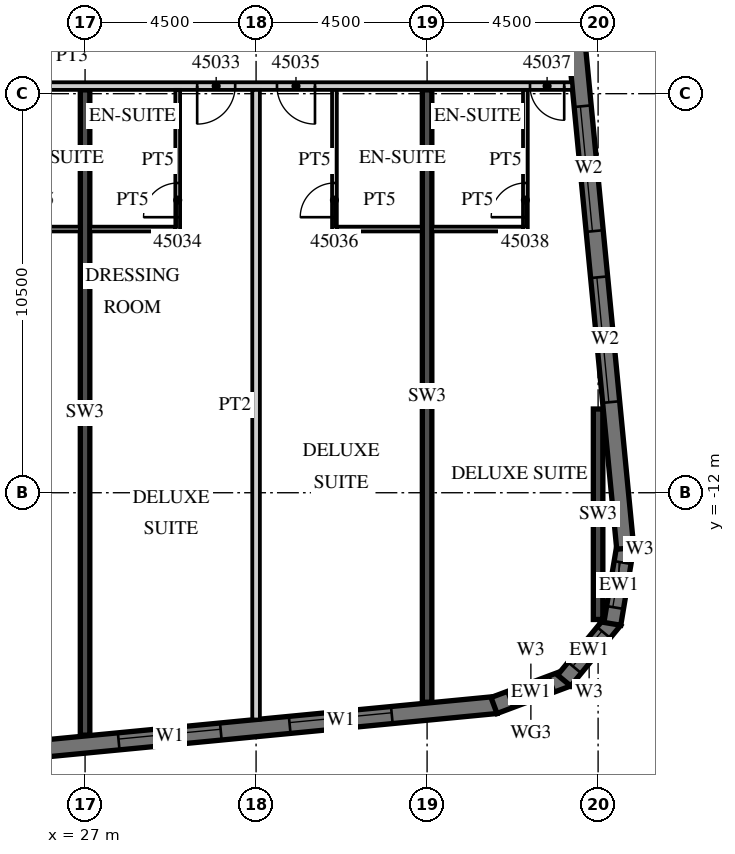
"""IFC4 building model, lengths in metres.
Left out: names, types, materials, properties, quantities, classifications, styles, units other than length and angle.
Written with IfcOpenShell. Run it as: python <this file> out.ifc"""

import sys

from ifc_helpers import new_model, si_unit, direction, frame, frame_2d, origin, place, context, subcontext, project, spatial, polyline, rectangle, outline, extrude, element, fill, save


model = new_model("IFC4")
c1 = context("Model", 3, precision=1e-05, world=origin(), true_north=direction((0.0, 1.0)))
c2 = subcontext(c1, "Body", "Model", "MODEL_VIEW")
j1 = project(units=[si_unit("LENGTHUNIT", "METRE"), si_unit("PLANEANGLEUNIT", "RADIAN")], contexts=[c1])
p1 = place(None, origin())
s1 = spatial("IfcSite", under=j1, at=p1, CompositionType="ELEMENT")
p2 = place(p1, origin())
s2 = spatial("IfcBuilding", under=s1, at=p2, CompositionType="ELEMENT")
p3 = place(p2, frame((0.0, 0.0, 190.0)))
s3 = spatial("IfcBuildingStorey", under=s2, at=p3, CompositionType="ELEMENT", Elevation=190.0)
p4 = place(p3, frame((27.0, -18.379, 0.0), z_axis=(0.0, 0.0, 1.0), x_axis=(0.0, 1.0, 0.0)))
e1 = element("IfcWall", 1, at=p4, inside=s3, PredefinedType="SHEAR", context=c2, shape_type="SweptSolid", body=[
    extrude(rectangle(XDim=16.979, YDim=0.25, at=frame_2d((8.489, 0.0))), origin(), (0.0, 0.0, 1.0), 3.3),
])
p5 = place(p3, frame((36.0, -17.512, 0.0), z_axis=(0.0, 0.0, 1.0), x_axis=(0.0, 1.0, 0.0)))
e2 = element("IfcWall", 2, at=p5, inside=s3, PredefinedType="SHEAR", context=c2, shape_type="SweptSolid", body=[
    extrude(rectangle(XDim=16.112, YDim=0.25, at=frame_2d((8.056, 0.0))), origin(), (0.0, 0.0, 1.0), 3.3),
])
p6 = place(p3, frame((40.5, -15.335, 0.0), z_axis=(0.0, 0.0, 1.0), x_axis=(0.0, 1.0, 0.0)))
e3 = element("IfcWall", 3, at=p6, inside=s3, PredefinedType="SHEAR", context=c2, shape_type="SweptSolid", body=[
    extrude(rectangle(XDim=5.538, YDim=0.25, at=frame_2d((2.769, 0.0))), origin(), (0.0, 0.0, 1.0), 3.3),
])
p7 = place(p3, frame((-13.521, -22.529, 0.0), z_axis=(0.0, 0.0, 1.0), x_axis=(0.995396436651, 0.095843277819, 0.0)))
e4 = element("IfcWall", 4, at=p7, inside=s3, PredefinedType="SOLIDWALL", context=c2, shape_type="SweptSolid", body=[
    extrude(rectangle(XDim=51.578, YDim=0.45, at=frame_2d((25.789, 0.0))), origin(), (0.0, 0.0, 1.0), 3.02),
])
p8 = place(p7, frame((0.91, 0.0, 0.45)))
e5 = element("IfcOpeningElement", 5, at=p8, cuts=e4, PredefinedType="OPENING", context=c2, shape_type="SweptSolid", body=[
    extrude(rectangle(XDim=2.7, YDim=2.25, at=frame_2d((1.35, 1.125))), frame((0.0, 0.235, 0.0), z_axis=(0.0, -1.0, 0.0), x_axis=(1.0, 0.0, 0.0)), (0.0, 0.0, 1.0), 0.47),
])
p9 = place(p7, frame((5.431, 0.0, 0.45)))
e6 = element("IfcOpeningElement", 6, at=p9, cuts=e4, PredefinedType="OPENING", context=c2, shape_type="SweptSolid", body=[
    extrude(rectangle(XDim=2.7, YDim=2.25, at=frame_2d((1.35, 1.125))), frame((0.0, 0.235, 0.0), z_axis=(0.0, -1.0, 0.0), x_axis=(1.0, 0.0, 0.0)), (0.0, 0.0, 1.0), 0.47),
])
p10 = place(p7, frame((9.952, 0.0, 0.45)))
e7 = element("IfcOpeningElement", 7, at=p10, cuts=e4, PredefinedType="OPENING", context=c2, shape_type="SweptSolid", body=[
    extrude(rectangle(XDim=2.7, YDim=2.25, at=frame_2d((1.35, 1.125))), frame((0.0, 0.235, 0.0), z_axis=(0.0, -1.0, 0.0), x_axis=(1.0, 0.0, 0.0)), (0.0, 0.0, 1.0), 0.47),
])
p11 = place(p7, frame((14.473, 0.0, 0.45)))
e8 = element("IfcOpeningElement", 8, at=p11, cuts=e4, PredefinedType="OPENING", context=c2, shape_type="SweptSolid", body=[
    extrude(rectangle(XDim=2.7, YDim=2.25, at=frame_2d((1.35, 1.125))), frame((0.0, 0.235, 0.0), z_axis=(0.0, -1.0, 0.0), x_axis=(1.0, 0.0, 0.0)), (0.0, 0.0, 1.0), 0.47),
])
p12 = place(p7, frame((18.994, 0.0, 0.45)))
e9 = element("IfcOpeningElement", 9, at=p12, cuts=e4, PredefinedType="OPENING", context=c2, shape_type="SweptSolid", body=[
    extrude(rectangle(XDim=2.7, YDim=2.25, at=frame_2d((1.35, 1.125))), frame((0.0, 0.235, 0.0), z_axis=(0.0, -1.0, 0.0), x_axis=(1.0, 0.0, 0.0)), (0.0, 0.0, 1.0), 0.47),
])
p13 = place(p7, frame((23.514, 0.0, 0.45)))
e10 = element("IfcOpeningElement", 10, at=p13, cuts=e4, PredefinedType="OPENING", context=c2, shape_type="SweptSolid", body=[
    extrude(rectangle(XDim=2.7, YDim=2.25, at=frame_2d((1.35, 1.125))), frame((0.0, 0.235, 0.0), z_axis=(0.0, -1.0, 0.0), x_axis=(1.0, 0.0, 0.0)), (0.0, 0.0, 1.0), 0.47),
])
p14 = place(p7, frame((28.035, 0.0, 0.45)))
e11 = element("IfcOpeningElement", 11, at=p14, cuts=e4, PredefinedType="OPENING", context=c2, shape_type="SweptSolid", body=[
    extrude(rectangle(XDim=2.7, YDim=2.25, at=frame_2d((1.35, 1.125))), frame((0.0, 0.235, 0.0), z_axis=(0.0, -1.0, 0.0), x_axis=(1.0, 0.0, 0.0)), (0.0, 0.0, 1.0), 0.47),
])
p15 = place(p7, frame((32.556, 0.0, 0.45)))
e12 = element("IfcOpeningElement", 12, at=p15, cuts=e4, PredefinedType="OPENING", context=c2, shape_type="SweptSolid", body=[
    extrude(rectangle(XDim=2.7, YDim=2.25, at=frame_2d((1.35, 1.125))), frame((0.0, 0.235, 0.0), z_axis=(0.0, -1.0, 0.0), x_axis=(1.0, 0.0, 0.0)), (0.0, 0.0, 1.0), 0.47),
])
p16 = place(p7, frame((37.077, 0.0, 0.45)))
e13 = element("IfcOpeningElement", 13, at=p16, cuts=e4, PredefinedType="OPENING", context=c2, shape_type="SweptSolid", body=[
    extrude(rectangle(XDim=2.7, YDim=2.25, at=frame_2d((1.35, 1.125))), frame((0.0, 0.235, 0.0), z_axis=(0.0, -1.0, 0.0), x_axis=(1.0, 0.0, 0.0)), (0.0, 0.0, 1.0), 0.47),
])
p17 = place(p7, frame((41.598, 0.0, 0.45)))
e14 = element("IfcOpeningElement", 14, at=p17, cuts=e4, PredefinedType="OPENING", context=c2, shape_type="SweptSolid", body=[
    extrude(rectangle(XDim=2.7, YDim=2.25, at=frame_2d((1.35, 1.125))), frame((0.0, 0.235, 0.0), z_axis=(0.0, -1.0, 0.0), x_axis=(1.0, 0.0, 0.0)), (0.0, 0.0, 1.0), 0.47),
])
p18 = place(p7, frame((46.119, 0.0, 0.45)))
e15 = element("IfcOpeningElement", 15, at=p18, cuts=e4, PredefinedType="OPENING", context=c2, shape_type="SweptSolid", body=[
    extrude(rectangle(XDim=2.7, YDim=2.25, at=frame_2d((1.35, 1.125))), frame((0.0, 0.235, 0.0), z_axis=(0.0, -1.0, 0.0), x_axis=(1.0, 0.0, 0.0)), (0.0, 0.0, 1.0), 0.47),
])
p19 = place(p3, frame((37.761, -17.598, 0.0), z_axis=(0.0, 0.0, 1.0), x_axis=(0.936677599948, 0.350192909346, 0.0)))
e16 = element("IfcWall", 16, at=p19, inside=s3, PredefinedType="SOLIDWALL", context=c2, shape_type="SweptSolid", body=[
    extrude(outline(polyline([(0.0, -0.225), (2.071, -0.225), (1.95, 0.225), (0.121, 0.225), (0.0, -0.225)])), origin(), (0.0, 0.0, 1.0), 3.02),
])
p20 = place(p19, frame((0.435, 0.0, 0.45)))
e17 = element("IfcOpeningElement", 17, at=p20, cuts=e16, PredefinedType="OPENING", context=c2, shape_type="SweptSolid", body=[
    extrude(rectangle(XDim=1.2, YDim=2.25, at=frame_2d((0.6, 1.125))), frame((0.0, 0.235, 0.0), z_axis=(0.0, -1.0, 0.0), x_axis=(1.0, 0.0, 0.0)), (0.0, 0.0, 1.0), 0.47),
])
p21 = place(p3, frame((39.606, -16.941, 0.0), z_axis=(0.0, 0.0, 1.0), x_axis=(0.636116318187, 0.771593176315, 0.0)))
e18 = element("IfcWall", 18, at=p21, inside=s3, PredefinedType="SOLIDWALL", context=c2, shape_type="SweptSolid", body=[
    extrude(outline(polyline([(0.0, -0.225), (2.071, -0.225), (1.95, 0.225), (0.121, 0.225), (0.0, -0.225)])), origin(), (0.0, 0.0, 1.0), 3.02),
])
p22 = place(p21, frame((0.435, 0.0, 0.45)))
e19 = element("IfcOpeningElement", 19, at=p22, cuts=e18, PredefinedType="OPENING", context=c2, shape_type="SweptSolid", body=[
    extrude(rectangle(XDim=1.2, YDim=2.25, at=frame_2d((0.6, 1.125))), frame((0.0, 0.235, 0.0), z_axis=(0.0, -1.0, 0.0), x_axis=(1.0, 0.0, 0.0)), (0.0, 0.0, 1.0), 0.47),
])
p23 = place(p3, frame((40.875, -15.449, 0.0), z_axis=(0.0, 0.0, 1.0), x_axis=(0.164953448126, 0.986301353518, 0.0)))
e20 = element("IfcWall", 20, at=p23, inside=s3, PredefinedType="SOLIDWALL", context=c2, shape_type="SweptSolid", body=[
    extrude(outline(polyline([(0.0, -0.225), (2.071, -0.225), (1.95, 0.225), (0.121, 0.225), (0.0, -0.225)])), origin(), (0.0, 0.0, 1.0), 3.02),
])
p24 = place(p23, frame((0.435, 0.0, 0.45)))
e21 = element("IfcOpeningElement", 21, at=p24, cuts=e20, PredefinedType="OPENING", context=c2, shape_type="SweptSolid", body=[
    extrude(rectangle(XDim=1.2, YDim=2.25, at=frame_2d((0.6, 1.125))), frame((0.0, 0.235, 0.0), z_axis=(0.0, -1.0, 0.0), x_axis=(1.0, 0.0, 0.0)), (0.0, 0.0, 1.0), 0.47),
])
p25 = place(p3, frame((41.214, -13.466, 0.0), z_axis=(0.0, 0.0, 1.0), x_axis=(-0.095847314626, 0.995396047952, 0.0)))
e22 = element("IfcWall", 22, at=p25, inside=s3, PredefinedType="SOLIDWALL", context=c2, shape_type="SweptSolid", body=[
    extrude(rectangle(XDim=34.0, YDim=0.45, at=frame_2d((17.0, 0.0))), origin(), (0.0, 0.0, 1.0), 3.02),
])
p26 = place(p25, frame((3.869, 0.0, 0.45)))
e23 = element("IfcOpeningElement", 23, at=p26, cuts=e22, PredefinedType="OPENING", context=c2, shape_type="SweptSolid", body=[
    extrude(rectangle(XDim=3.3, YDim=2.25, at=frame_2d((1.65, 1.125))), frame((0.0, 0.235, 0.0), z_axis=(0.0, -1.0, 0.0), x_axis=(1.0, 0.0, 0.0)), (0.0, 0.0, 1.0), 0.47),
])
p27 = place(p25, frame((8.39, 0.0, 0.45)))
e24 = element("IfcOpeningElement", 24, at=p27, cuts=e22, PredefinedType="OPENING", context=c2, shape_type="SweptSolid", body=[
    extrude(rectangle(XDim=3.3, YDim=2.25, at=frame_2d((1.65, 1.125))), frame((0.0, 0.235, 0.0), z_axis=(0.0, -1.0, 0.0), x_axis=(1.0, 0.0, 0.0)), (0.0, 0.0, 1.0), 0.47),
])
p28 = place(p3, frame((13.5, -1.3, 0.0), z_axis=(0.0, 0.0, 1.0), x_axis=(1.0, 0.0, 0.0)))
e25 = element("IfcWall", 25, at=p28, inside=s3, PredefinedType="PARTITIONING", context=c2, shape_type="SweptSolid", body=[
    extrude(rectangle(XDim=26.317, YDim=0.2, at=frame_2d((13.158, 0.0))), origin(), (0.0, 0.0, 1.0), 3.02),
])
p29 = place(p28, frame((0.575, 0.0, 0.0)))
e26 = element("IfcOpeningElement", 26, at=p29, cuts=e25, PredefinedType="OPENING", context=c2, shape_type="SweptSolid", body=[
    extrude(rectangle(XDim=1.0, YDim=2.1, at=frame_2d((0.5, 1.05))), frame((0.0, 0.11, 0.0), z_axis=(0.0, -1.0, 0.0), x_axis=(1.0, 0.0, 0.0)), (0.0, 0.0, 1.0), 0.22),
])
p30 = place(p28, frame((5.075, 0.0, 0.0)))
e27 = element("IfcOpeningElement", 27, at=p30, cuts=e25, PredefinedType="OPENING", context=c2, shape_type="SweptSolid", body=[
    extrude(rectangle(XDim=1.0, YDim=2.1, at=frame_2d((0.5, 1.05))), frame((0.0, 0.11, 0.0), z_axis=(0.0, -1.0, 0.0), x_axis=(1.0, 0.0, 0.0)), (0.0, 0.0, 1.0), 0.22),
])
p31 = place(p28, frame((9.55, 0.0, 0.0)))
e28 = element("IfcOpeningElement", 28, at=p31, cuts=e25, PredefinedType="OPENING", context=c2, shape_type="SweptSolid", body=[
    extrude(rectangle(XDim=1.0, YDim=2.1, at=frame_2d((0.5, 1.05))), frame((0.0, 0.11, 0.0), z_axis=(0.0, -1.0, 0.0), x_axis=(1.0, 0.0, 0.0)), (0.0, 0.0, 1.0), 0.22),
])
p32 = place(p28, frame((16.45, 0.0, 0.0)))
e29 = element("IfcOpeningElement", 29, at=p32, cuts=e25, PredefinedType="OPENING", context=c2, shape_type="SweptSolid", body=[
    extrude(rectangle(XDim=1.0, YDim=2.1, at=frame_2d((0.5, 1.05))), frame((0.0, 0.11, 0.0), z_axis=(0.0, -1.0, 0.0), x_axis=(1.0, 0.0, 0.0)), (0.0, 0.0, 1.0), 0.22),
])
p33 = place(p28, frame((18.55, 0.0, 0.0)))
e30 = element("IfcOpeningElement", 30, at=p33, cuts=e25, PredefinedType="OPENING", context=c2, shape_type="SweptSolid", body=[
    extrude(rectangle(XDim=1.0, YDim=2.1, at=frame_2d((0.5, 1.05))), frame((0.0, 0.11, 0.0), z_axis=(0.0, -1.0, 0.0), x_axis=(1.0, 0.0, 0.0)), (0.0, 0.0, 1.0), 0.22),
])
p34 = place(p28, frame((25.208, 0.0, 0.0)))
e31 = element("IfcOpeningElement", 31, at=p34, cuts=e25, PredefinedType="OPENING", context=c2, shape_type="SweptSolid", body=[
    extrude(rectangle(XDim=0.9, YDim=2.1, at=frame_2d((0.45, 1.05))), frame((0.0, 0.11, 0.0), z_axis=(0.0, -1.0, 0.0), x_axis=(1.0, 0.0, 0.0)), (0.0, 0.0, 1.0), 0.22),
])
p35 = place(p3, frame((24.625, -5.062, 0.0), z_axis=(0.0, 0.0, 1.0), x_axis=(1.0, 0.0, 0.0)))
e32 = element("IfcWall", 32, at=p35, inside=s3, PredefinedType="PARTITIONING", context=c2, shape_type="SweptSolid", body=[
    extrude(rectangle(XDim=2.25, YDim=0.125, at=frame_2d((1.125, 0.0))), origin(), (0.0, 0.0, 1.0), 3.02),
])
p36 = place(p3, frame((31.5, -17.967, 0.0), z_axis=(0.0, 0.0, 1.0), x_axis=(0.0, 1.0, 0.0)))
e33 = element("IfcWall", 33, at=p36, inside=s3, PredefinedType="PARTITIONING", context=c2, shape_type="SweptSolid", body=[
    extrude(rectangle(XDim=16.567, YDim=0.2, at=frame_2d((8.284, 0.0))), origin(), (0.0, 0.0, 1.0), 3.02),
])
p37 = place(p3, frame((29.438, -5.125, 0.0), z_axis=(0.0, 0.0, 1.0), x_axis=(0.0, 1.0, 0.0)))
e34 = element("IfcWall", 34, at=p37, inside=s3, PredefinedType="PARTITIONING", context=c2, shape_type="SweptSolid", body=[
    extrude(rectangle(XDim=3.725, YDim=0.125, at=frame_2d((1.863, 0.0))), origin(), (0.0, 0.0, 1.0), 3.02),
])
p38 = place(p37, frame((0.375, 0.0, 0.0)))
e35 = element("IfcOpeningElement", 35, at=p38, cuts=e34, PredefinedType="OPENING", context=c2, shape_type="SweptSolid", body=[
    extrude(rectangle(XDim=0.9, YDim=2.1, at=frame_2d((0.45, 1.05))), frame((0.0, 0.073, 0.0), z_axis=(0.0, -1.0, 0.0), x_axis=(1.0, 0.0, 0.0)), (0.0, 0.0, 1.0), 0.145),
])
p39 = place(p3, frame((27.125, -5.062, 0.0), z_axis=(0.0, 0.0, 1.0), x_axis=(1.0, 0.0, 0.0)))
e36 = element("IfcWall", 36, at=p39, inside=s3, PredefinedType="PARTITIONING", context=c2, shape_type="SweptSolid", body=[
    extrude(rectangle(XDim=2.25, YDim=0.125, at=frame_2d((1.125, 0.0))), origin(), (0.0, 0.0, 1.0), 3.02),
])
p40 = place(p3, frame((33.562, -5.125, 0.0), z_axis=(0.0, 0.0, 1.0), x_axis=(0.0, 1.0, 0.0)))
e37 = element("IfcWall", 37, at=p40, inside=s3, PredefinedType="PARTITIONING", context=c2, shape_type="SweptSolid", body=[
    extrude(rectangle(XDim=3.725, YDim=0.125, at=frame_2d((1.863, 0.0))), origin(), (0.0, 0.0, 1.0), 3.02),
])
p41 = place(p40, frame((0.375, 0.0, 0.0)))
e38 = element("IfcOpeningElement", 38, at=p41, cuts=e37, PredefinedType="OPENING", context=c2, shape_type="SweptSolid", body=[
    extrude(rectangle(XDim=0.9, YDim=2.1, at=frame_2d((0.45, 1.05))), frame((0.0, 0.073, 0.0), z_axis=(0.0, -1.0, 0.0), x_axis=(1.0, 0.0, 0.0)), (0.0, 0.0, 1.0), 0.145),
])
p42 = place(p3, frame((33.625, -5.062, 0.0), z_axis=(0.0, 0.0, 1.0), x_axis=(1.0, 0.0, 0.0)))
e39 = element("IfcWall", 39, at=p42, inside=s3, PredefinedType="PARTITIONING", context=c2, shape_type="SweptSolid", body=[
    extrude(rectangle(XDim=2.25, YDim=0.125, at=frame_2d((1.125, 0.0))), origin(), (0.0, 0.0, 1.0), 3.02),
])
p43 = place(p3, frame((38.587, -5.125, 0.0), z_axis=(0.0, 0.0, 1.0), x_axis=(0.0, 1.0, 0.0)))
e40 = element("IfcWall", 40, at=p43, inside=s3, PredefinedType="PARTITIONING", context=c2, shape_type="SweptSolid", body=[
    extrude(rectangle(XDim=3.725, YDim=0.125, at=frame_2d((1.863, 0.0))), origin(), (0.0, 0.0, 1.0), 3.02),
])
p44 = place(p43, frame((0.375, 0.0, 0.0)))
e41 = element("IfcOpeningElement", 41, at=p44, cuts=e40, PredefinedType="OPENING", context=c2, shape_type="SweptSolid", body=[
    extrude(rectangle(XDim=0.9, YDim=2.1, at=frame_2d((0.45, 1.05))), frame((0.0, 0.073, 0.0), z_axis=(0.0, -1.0, 0.0), x_axis=(1.0, 0.0, 0.0)), (0.0, 0.0, 1.0), 0.145),
])
p45 = place(p3, frame((36.125, -5.062, 0.0), z_axis=(0.0, 0.0, 1.0), x_axis=(1.0, 0.0, 0.0)))
e42 = element("IfcWall", 42, at=p45, inside=s3, PredefinedType="PARTITIONING", context=c2, shape_type="SweptSolid", body=[
    extrude(rectangle(XDim=2.4, YDim=0.125, at=frame_2d((1.2, 0.0))), origin(), (0.0, 0.0, 1.0), 3.02),
])
p46 = place(p17, origin())
e43 = element("IfcWindow", 43, at=p46, inside=s3, PartitioningType="SINGLE_PANEL", PredefinedType="WINDOW", context=c2, shape_type="SweptSolid", body=[
    extrude(rectangle(XDim=2.7, YDim=2.25, at=frame_2d((1.35, 1.125))), frame((0.0, 0.09, 0.0), z_axis=(0.0, -1.0, 0.0), x_axis=(1.0, 0.0, 0.0)), (0.0, 0.0, 1.0), 0.06),
])
fill(e14, e43)
p47 = place(p18, origin())
e44 = element("IfcWindow", 44, at=p47, inside=s3, PartitioningType="SINGLE_PANEL", PredefinedType="WINDOW", context=c2, shape_type="SweptSolid", body=[
    extrude(rectangle(XDim=2.7, YDim=2.25, at=frame_2d((1.35, 1.125))), frame((0.0, 0.09, 0.0), z_axis=(0.0, -1.0, 0.0), x_axis=(1.0, 0.0, 0.0)), (0.0, 0.0, 1.0), 0.06),
])
fill(e15, e44)
p48 = place(p20, origin())
e45 = element("IfcWindow", 45, at=p48, inside=s3, PartitioningType="SINGLE_PANEL", PredefinedType="WINDOW", context=c2, shape_type="SweptSolid", body=[
    extrude(rectangle(XDim=1.2, YDim=2.25, at=frame_2d((0.6, 1.125))), frame((0.0, 0.09, 0.0), z_axis=(0.0, -1.0, 0.0), x_axis=(1.0, 0.0, 0.0)), (0.0, 0.0, 1.0), 0.06),
])
fill(e17, e45)
p49 = place(p22, origin())
e46 = element("IfcWindow", 46, at=p49, inside=s3, PartitioningType="SINGLE_PANEL", PredefinedType="WINDOW", context=c2, shape_type="SweptSolid", body=[
    extrude(rectangle(XDim=1.2, YDim=2.25, at=frame_2d((0.6, 1.125))), frame((0.0, 0.09, 0.0), z_axis=(0.0, -1.0, 0.0), x_axis=(1.0, 0.0, 0.0)), (0.0, 0.0, 1.0), 0.06),
])
fill(e19, e46)
p50 = place(p24, origin())
e47 = element("IfcWindow", 47, at=p50, inside=s3, PartitioningType="SINGLE_PANEL", PredefinedType="WINDOW", context=c2, shape_type="SweptSolid", body=[
    extrude(rectangle(XDim=1.2, YDim=2.25, at=frame_2d((0.6, 1.125))), frame((0.0, 0.09, 0.0), z_axis=(0.0, -1.0, 0.0), x_axis=(1.0, 0.0, 0.0)), (0.0, 0.0, 1.0), 0.06),
])
fill(e21, e47)
p51 = place(p26, origin())
e48 = element("IfcWindow", 48, at=p51, inside=s3, PartitioningType="SINGLE_PANEL", PredefinedType="WINDOW", context=c2, shape_type="SweptSolid", body=[
    extrude(rectangle(XDim=3.3, YDim=2.25, at=frame_2d((1.65, 1.125))), frame((0.0, 0.09, 0.0), z_axis=(0.0, -1.0, 0.0), x_axis=(1.0, 0.0, 0.0)), (0.0, 0.0, 1.0), 0.06),
])
fill(e23, e48)
p52 = place(p27, origin())
e49 = element("IfcWindow", 49, at=p52, inside=s3, PartitioningType="SINGLE_PANEL", PredefinedType="WINDOW", context=c2, shape_type="SweptSolid", body=[
    extrude(rectangle(XDim=3.3, YDim=2.25, at=frame_2d((1.65, 1.125))), frame((0.0, 0.09, 0.0), z_axis=(0.0, -1.0, 0.0), x_axis=(1.0, 0.0, 0.0)), (0.0, 0.0, 1.0), 0.06),
])
fill(e24, e49)
p53 = place(p32, origin())
e50 = element("IfcDoor", 50, at=p53, inside=s3, OperationType="SINGLE_SWING_LEFT", PredefinedType="DOOR", context=c2, shape_type="SweptSolid", body=[
    extrude(rectangle(XDim=1.0, YDim=2.1, at=frame_2d((0.5, 1.05))), frame((0.0, 0.025, 0.0), z_axis=(0.0, -1.0, 0.0), x_axis=(1.0, 0.0, 0.0)), (0.0, 0.0, 1.0), 0.05),
])
fill(e29, e50)
p54 = place(p38, origin())
e51 = element("IfcDoor", 51, at=p54, inside=s3, OperationType="SINGLE_SWING_LEFT", PredefinedType="DOOR", context=c2, shape_type="SweptSolid", body=[
    extrude(rectangle(XDim=0.9, YDim=2.1, at=frame_2d((0.45, 1.05))), frame((0.0, 0.025, 0.0), z_axis=(0.0, -1.0, 0.0), x_axis=(1.0, 0.0, 0.0)), (0.0, 0.0, 1.0), 0.05),
])
fill(e35, e51)
p55 = place(p33, origin())
e52 = element("IfcDoor", 52, at=p55, inside=s3, OperationType="SINGLE_SWING_RIGHT", PredefinedType="DOOR", context=c2, shape_type="SweptSolid", body=[
    extrude(rectangle(XDim=1.0, YDim=2.1, at=frame_2d((0.5, 1.05))), frame((0.0, 0.025, 0.0), z_axis=(0.0, -1.0, 0.0), x_axis=(1.0, 0.0, 0.0)), (0.0, 0.0, 1.0), 0.05),
])
fill(e30, e52)
p56 = place(p41, origin())
e53 = element("IfcDoor", 53, at=p56, inside=s3, OperationType="SINGLE_SWING_LEFT", PredefinedType="DOOR", context=c2, shape_type="SweptSolid", body=[
    extrude(rectangle(XDim=0.9, YDim=2.1, at=frame_2d((0.45, 1.05))), frame((0.0, 0.025, 0.0), z_axis=(0.0, -1.0, 0.0), x_axis=(1.0, 0.0, 0.0)), (0.0, 0.0, 1.0), 0.05),
])
fill(e38, e53)
p57 = place(p34, origin())
e54 = element("IfcDoor", 54, at=p57, inside=s3, OperationType="SINGLE_SWING_RIGHT", PredefinedType="DOOR", context=c2, shape_type="SweptSolid", body=[
    extrude(rectangle(XDim=0.9, YDim=2.1, at=frame_2d((0.45, 1.05))), frame((0.0, 0.025, 0.0), z_axis=(0.0, -1.0, 0.0), x_axis=(1.0, 0.0, 0.0)), (0.0, 0.0, 1.0), 0.05),
])
fill(e31, e54)
p58 = place(p44, origin())
e55 = element("IfcDoor", 55, at=p58, inside=s3, OperationType="SINGLE_SWING_LEFT", PredefinedType="DOOR", context=c2, shape_type="SweptSolid", body=[
    extrude(rectangle(XDim=0.9, YDim=2.1, at=frame_2d((0.45, 1.05))), frame((0.0, 0.025, 0.0), z_axis=(0.0, -1.0, 0.0), x_axis=(1.0, 0.0, 0.0)), (0.0, 0.0, 1.0), 0.05),
])
fill(e41, e55)
save(model, sys.argv[1])
